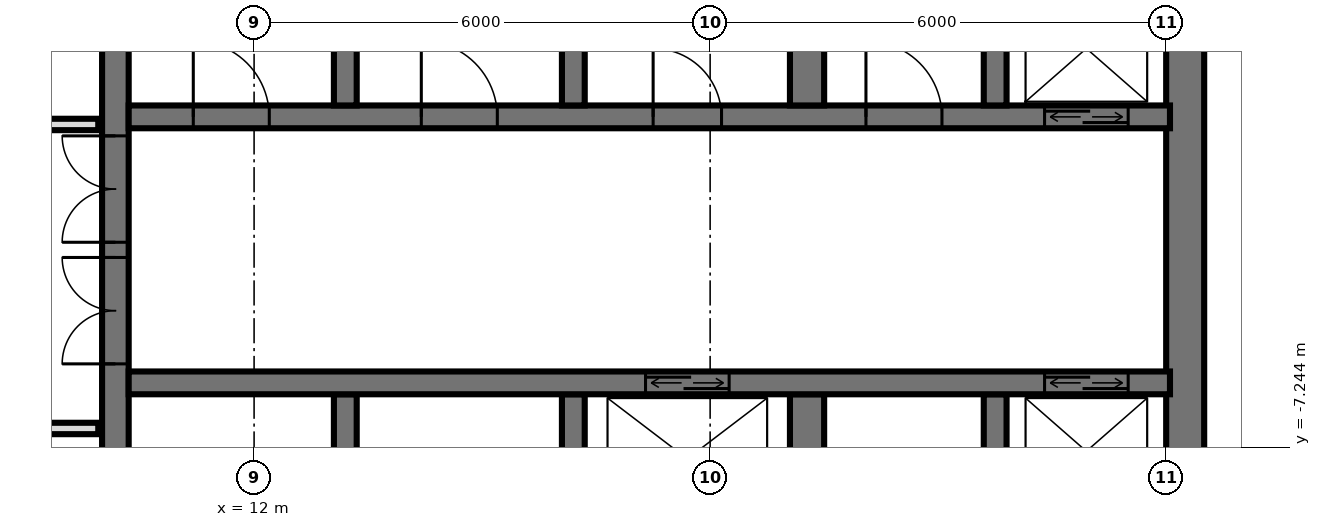
"""IFC4 building model, lengths in metres.
Left out: names, types, materials, properties, quantities, classifications, styles, units other than length and angle.
Written with IfcOpenShell. Run it as: python <this file> out.ifc"""

import sys

from ifc_helpers import new_model, si_unit, direction, frame, frame_2d, origin, place, context, subcontext, project, spatial, rectangle, extrude, element, fill, save


model = new_model("IFC4")
c1 = context("Model", 3, precision=1e-05, world=origin(), true_north=direction((0.0, 1.0)))
c2 = subcontext(c1, "Body", "Model", "MODEL_VIEW")
j1 = project(units=[si_unit("LENGTHUNIT", "METRE"), si_unit("PLANEANGLEUNIT", "RADIAN")], contexts=[c1])
p1 = place(None, origin())
s1 = spatial("IfcSite", under=j1, at=p1, CompositionType="ELEMENT")
p2 = place(p1, origin())
s2 = spatial("IfcBuilding", under=s1, at=p2, CompositionType="ELEMENT")
p3 = place(p2, frame((0.0, 0.0, 236.1)))
s3 = spatial("IfcBuildingStorey", under=s2, at=p3, CompositionType="ELEMENT", Elevation=236.1)
p4 = place(p3, frame((10.175, -14.55, 0.0), z_axis=(0.0, 0.0, 1.0), x_axis=(0.0, 1.0, 0.0)))
e1 = element("IfcWall", 1, at=p4, inside=s3, PredefinedType="SHEAR", context=c2, shape_type="SweptSolid", body=[
    extrude(rectangle(XDim=14.1, YDim=0.35, at=frame_2d((7.05, 0.0))), origin(), (0.0, 0.0, 1.0), 3.5),
])
p5 = place(p4, frame((8.4, 0.0, 0.0)))
e2 = element("IfcOpeningElement", 2, at=p5, cuts=e1, PredefinedType="OPENING", context=c2, shape_type="SweptSolid", body=[
    extrude(rectangle(XDim=1.4, YDim=2.4, at=frame_2d((0.7, 1.2))), frame((0.0, 0.185, 0.0), z_axis=(0.0, -1.0, 0.0), x_axis=(1.0, 0.0, 0.0)), (0.0, 0.0, 1.0), 0.37),
])
p6 = place(p4, frame((10.0, 0.0, 0.0)))
e3 = element("IfcOpeningElement", 3, at=p6, cuts=e1, PredefinedType="OPENING", context=c2, shape_type="SweptSolid", body=[
    extrude(rectangle(XDim=1.4, YDim=2.4, at=frame_2d((0.7, 1.2))), frame((0.0, 0.185, 0.0), z_axis=(0.0, -1.0, 0.0), x_axis=(1.0, 0.0, 0.0)), (0.0, 0.0, 1.0), 0.37),
])
p7 = place(p4, frame((4.0, 0.0, 0.0)))
e4 = element("IfcOpeningElement", 4, at=p7, cuts=e1, PredefinedType="OPENING", context=c2, shape_type="SweptSolid", body=[
    extrude(rectangle(XDim=1.2, YDim=2.1, at=frame_2d((0.6, 1.05))), frame((0.0, 0.185, 0.0), z_axis=(0.0, -1.0, 0.0), x_axis=(1.0, 0.0, 0.0)), (0.0, 0.0, 1.0), 0.37),
])
p8 = place(p3, frame((24.25, -14.55, 0.0), z_axis=(0.0, 0.0, 1.0), x_axis=(0.0, 1.0, 0.0)))
e5 = element("IfcWall", 5, at=p8, inside=s3, PredefinedType="SHEAR", context=c2, shape_type="SweptSolid", body=[
    extrude(rectangle(XDim=14.1, YDim=0.5, at=frame_2d((7.05, 0.0))), origin(), (0.0, 0.0, 1.0), 3.5),
])
p9 = place(p3, frame((10.35, -2.9, 0.0), z_axis=(0.0, 0.0, 1.0), x_axis=(1.0, 0.0, 0.0)))
e6 = element("IfcWall", 6, at=p9, inside=s3, PredefinedType="SHEAR", context=c2, shape_type="SweptSolid", body=[
    extrude(rectangle(XDim=13.7, YDim=0.3, at=frame_2d((6.85, 0.0))), origin(), (0.0, 0.0, 1.0), 3.5),
])
p10 = place(p9, frame((12.05, 0.0, 0.0)))
e7 = element("IfcOpeningElement", 7, at=p10, cuts=e6, PredefinedType="OPENING", context=c2, shape_type="SweptSolid", body=[
    extrude(rectangle(XDim=1.1, YDim=2.1, at=frame_2d((0.55, 1.05))), frame((0.0, 0.16, 0.0), z_axis=(0.0, -1.0, 0.0), x_axis=(1.0, 0.0, 0.0)), (0.0, 0.0, 1.0), 0.32),
])
p11 = place(p9, frame((6.9, 0.0, 0.0)))
e8 = element("IfcOpeningElement", 8, at=p11, cuts=e6, PredefinedType="OPENING", context=c2, shape_type="SweptSolid", body=[
    extrude(rectangle(XDim=0.9, YDim=2.1, at=frame_2d((0.45, 1.05))), frame((0.0, 0.16, 0.0), z_axis=(0.0, -1.0, 0.0), x_axis=(1.0, 0.0, 0.0)), (0.0, 0.0, 1.0), 0.32),
])
p12 = place(p9, frame((0.85, 0.0, 0.0)))
e9 = element("IfcOpeningElement", 9, at=p12, cuts=e6, PredefinedType="OPENING", context=c2, shape_type="SweptSolid", body=[
    extrude(rectangle(XDim=1.0, YDim=2.1, at=frame_2d((0.5, 1.05))), frame((0.0, 0.16, 0.0), z_axis=(0.0, -1.0, 0.0), x_axis=(1.0, 0.0, 0.0)), (0.0, 0.0, 1.0), 0.32),
])
p13 = place(p9, frame((3.85, 0.0, 0.0)))
e10 = element("IfcOpeningElement", 10, at=p13, cuts=e6, PredefinedType="OPENING", context=c2, shape_type="SweptSolid", body=[
    extrude(rectangle(XDim=1.0, YDim=2.1, at=frame_2d((0.5, 1.05))), frame((0.0, 0.16, 0.0), z_axis=(0.0, -1.0, 0.0), x_axis=(1.0, 0.0, 0.0)), (0.0, 0.0, 1.0), 0.32),
])
p14 = place(p9, frame((9.7, 0.0, 0.0)))
e11 = element("IfcOpeningElement", 11, at=p14, cuts=e6, PredefinedType="OPENING", context=c2, shape_type="SweptSolid", body=[
    extrude(rectangle(XDim=1.0, YDim=2.1, at=frame_2d((0.5, 1.05))), frame((0.0, 0.16, 0.0), z_axis=(0.0, -1.0, 0.0), x_axis=(1.0, 0.0, 0.0)), (0.0, 0.0, 1.0), 0.32),
])
p15 = place(p3, frame((10.35, -6.4, 0.0), z_axis=(0.0, 0.0, 1.0), x_axis=(1.0, 0.0, 0.0)))
e12 = element("IfcWall", 12, at=p15, inside=s3, PredefinedType="SHEAR", context=c2, shape_type="SweptSolid", body=[
    extrude(rectangle(XDim=13.7, YDim=0.3, at=frame_2d((6.85, 0.0))), origin(), (0.0, 0.0, 1.0), 3.5),
])
p16 = place(p15, frame((12.05, 0.0, 0.0)))
e13 = element("IfcOpeningElement", 13, at=p16, cuts=e12, PredefinedType="OPENING", context=c2, shape_type="SweptSolid", body=[
    extrude(rectangle(XDim=1.1, YDim=2.1, at=frame_2d((0.55, 1.05))), frame((0.0, 0.16, 0.0), z_axis=(0.0, -1.0, 0.0), x_axis=(1.0, 0.0, 0.0)), (0.0, 0.0, 1.0), 0.32),
])
p17 = place(p15, frame((6.8, 0.0, 0.0)))
e14 = element("IfcOpeningElement", 14, at=p17, cuts=e12, PredefinedType="OPENING", context=c2, shape_type="SweptSolid", body=[
    extrude(rectangle(XDim=1.1, YDim=2.1, at=frame_2d((0.55, 1.05))), frame((0.0, 0.16, 0.0), z_axis=(0.0, -1.0, 0.0), x_axis=(1.0, 0.0, 0.0)), (0.0, 0.0, 1.0), 0.32),
])
for number, where, z_axis, x_axis in (
    (15, (13.2, -2.75, 0.0), (0.0, 0.0, 1.0), (0.0, 1.0, 0.0)),
    (16, (13.2, -8.85, 0.0), (0.0, 0.0, 1.0), (0.0, 1.0, 0.0)),
    (17, (16.2, -2.75, 0.0), (0.0, 0.0, 1.0), (0.0, 1.0, 0.0)),
    (18, (16.2, -8.85, 0.0), (0.0, 0.0, 1.0), (0.0, 1.0, 0.0)),
):
    element("IfcWall", number, at=place(p3, frame(where, z_axis=z_axis, x_axis=x_axis)), inside=s3, PredefinedType="SHEAR", context=c2, shape_type="SweptSolid", body=[
        extrude(rectangle(XDim=2.3, YDim=0.3, at=frame_2d((1.15, 0.0))), origin(), (0.0, 0.0, 1.0), 3.5),
    ])
for number, where, z_axis, x_axis in (
    (19, (19.275, -2.75, 0.0), (0.0, 0.0, 1.0), (0.0, 1.0, 0.0)),
    (20, (19.275, -8.85, 0.0), (0.0, 0.0, 1.0), (0.0, 1.0, 0.0)),
):
    element("IfcWall", number, at=place(p3, frame(where, z_axis=z_axis, x_axis=x_axis)), inside=s3, PredefinedType="SHEAR", context=c2, shape_type="SweptSolid", body=[
        extrude(rectangle(XDim=2.3, YDim=0.45, at=frame_2d((1.15, 0.0))), origin(), (0.0, 0.0, 1.0), 3.5),
    ])
for number, where, z_axis, x_axis in (
    (21, (21.75, -2.75, 0.0), (0.0, 0.0, 1.0), (0.0, 1.0, 0.0)),
    (22, (21.75, -8.85, 0.0), (0.0, 0.0, 1.0), (0.0, 1.0, 0.0)),
):
    element("IfcWall", number, at=place(p3, frame(where, z_axis=z_axis, x_axis=x_axis)), inside=s3, PredefinedType="SHEAR", context=c2, shape_type="SweptSolid", body=[
        extrude(rectangle(XDim=2.3, YDim=0.3, at=frame_2d((1.15, 0.0))), origin(), (0.0, 0.0, 1.0), 3.5),
    ])
p18 = place(p3, frame((-9.95, -7.0, 0.0), z_axis=(0.0, 0.0, 1.0), x_axis=(1.0, 0.0, 0.0)))
e23 = element("IfcWall", 23, at=p18, inside=s3, PredefinedType="PARTITIONING", context=c2, shape_type="SweptSolid", body=[
    extrude(rectangle(XDim=19.9, YDim=0.15, at=frame_2d((9.95, 0.0))), origin(), (0.0, 0.0, 1.0), 3.22),
])
p19 = place(p18, frame((9.45, 0.0, 0.0)))
e24 = element("IfcOpeningElement", 24, at=p19, cuts=e23, PredefinedType="OPENING", context=c2, shape_type="SweptSolid", body=[
    extrude(rectangle(XDim=1.0, YDim=2.1, at=frame_2d((0.5, 1.05))), frame((0.0, 0.085, 0.0), z_axis=(0.0, -1.0, 0.0), x_axis=(1.0, 0.0, 0.0)), (0.0, 0.0, 1.0), 0.17),
])
p20 = place(p18, frame((15.45, 0.0, 0.0)))
e25 = element("IfcOpeningElement", 25, at=p20, cuts=e23, PredefinedType="OPENING", context=c2, shape_type="SweptSolid", body=[
    extrude(rectangle(XDim=1.0, YDim=2.1, at=frame_2d((0.5, 1.05))), frame((0.0, 0.085, 0.0), z_axis=(0.0, -1.0, 0.0), x_axis=(1.0, 0.0, 0.0)), (0.0, 0.0, 1.0), 0.17),
])
p21 = place(p3, frame((-9.95, -3.0, 0.0), z_axis=(0.0, 0.0, 1.0), x_axis=(1.0, 0.0, 0.0)))
e26 = element("IfcWall", 26, at=p21, inside=s3, PredefinedType="PARTITIONING", context=c2, shape_type="SweptSolid", body=[
    extrude(rectangle(XDim=19.9, YDim=0.15, at=frame_2d((9.95, 0.0))), origin(), (0.0, 0.0, 1.0), 3.22),
])
p22 = place(p21, frame((2.2, 0.0, 0.0)))
e27 = element("IfcOpeningElement", 27, at=p22, cuts=e26, PredefinedType="OPENING", context=c2, shape_type="SweptSolid", body=[
    extrude(rectangle(XDim=1.0, YDim=2.1, at=frame_2d((0.5, 1.05))), frame((0.0, 0.085, 0.0), z_axis=(0.0, -1.0, 0.0), x_axis=(1.0, 0.0, 0.0)), (0.0, 0.0, 1.0), 0.17),
])
p23 = place(p21, frame((7.2, 0.0, 0.0)))
e28 = element("IfcOpeningElement", 28, at=p23, cuts=e26, PredefinedType="OPENING", context=c2, shape_type="SweptSolid", body=[
    extrude(rectangle(XDim=1.0, YDim=2.1, at=frame_2d((0.5, 1.05))), frame((0.0, 0.085, 0.0), z_axis=(0.0, -1.0, 0.0), x_axis=(1.0, 0.0, 0.0)), (0.0, 0.0, 1.0), 0.17),
])
p24 = place(p21, frame((11.7, 0.0, 0.0)))
e29 = element("IfcOpeningElement", 29, at=p24, cuts=e26, PredefinedType="OPENING", context=c2, shape_type="SweptSolid", body=[
    extrude(rectangle(XDim=1.0, YDim=2.1, at=frame_2d((0.5, 1.05))), frame((0.0, 0.085, 0.0), z_axis=(0.0, -1.0, 0.0), x_axis=(1.0, 0.0, 0.0)), (0.0, 0.0, 1.0), 0.17),
])
p25 = place(p21, frame((15.45, 0.0, 0.0)))
e30 = element("IfcOpeningElement", 30, at=p25, cuts=e26, PredefinedType="OPENING", context=c2, shape_type="SweptSolid", body=[
    extrude(rectangle(XDim=1.0, YDim=2.1, at=frame_2d((0.5, 1.05))), frame((0.0, 0.085, 0.0), z_axis=(0.0, -1.0, 0.0), x_axis=(1.0, 0.0, 0.0)), (0.0, 0.0, 1.0), 0.17),
])
p26 = place(p21, frame((18.2, 0.0, 0.0)))
e31 = element("IfcOpeningElement", 31, at=p26, cuts=e26, PredefinedType="OPENING", context=c2, shape_type="SweptSolid", body=[
    extrude(rectangle(XDim=1.0, YDim=2.1, at=frame_2d((0.5, 1.05))), frame((0.0, 0.085, 0.0), z_axis=(0.0, -1.0, 0.0), x_axis=(1.0, 0.0, 0.0)), (0.0, 0.0, 1.0), 0.17),
])
p27 = place(p10, origin())
e32 = element("IfcDoor", 32, at=p27, inside=s3, OperationType="DOUBLE_DOOR_SLIDING", PredefinedType="USERDEFINED", context=c2, shape_type="SweptSolid", body=[
    extrude(rectangle(XDim=1.1, YDim=2.1, at=frame_2d((0.55, 1.05))), frame((0.0, 0.025, 0.0), z_axis=(0.0, -1.0, 0.0), x_axis=(1.0, 0.0, 0.0)), (0.0, 0.0, 1.0), 0.05),
])
fill(e7, e32)
p28 = place(p16, origin())
e33 = element("IfcDoor", 33, at=p28, inside=s3, OperationType="DOUBLE_DOOR_SLIDING", PredefinedType="USERDEFINED", context=c2, shape_type="SweptSolid", body=[
    extrude(rectangle(XDim=1.1, YDim=2.1, at=frame_2d((0.55, 1.05))), frame((0.0, 0.025, 0.0), z_axis=(0.0, -1.0, 0.0), x_axis=(1.0, 0.0, 0.0)), (0.0, 0.0, 1.0), 0.05),
])
fill(e13, e33)
p29 = place(p17, origin())
e34 = element("IfcDoor", 34, at=p29, inside=s3, OperationType="DOUBLE_DOOR_SLIDING", PredefinedType="USERDEFINED", context=c2, shape_type="SweptSolid", body=[
    extrude(rectangle(XDim=1.1, YDim=2.1, at=frame_2d((0.55, 1.05))), frame((0.0, 0.025, 0.0), z_axis=(0.0, -1.0, 0.0), x_axis=(1.0, 0.0, 0.0)), (0.0, 0.0, 1.0), 0.05),
])
fill(e14, e34)
p30 = place(p5, origin())
e35 = element("IfcDoor", 35, at=p30, inside=s3, OperationType="DOUBLE_DOOR_SINGLE_SWING", PredefinedType="DOOR", context=c2, shape_type="SweptSolid", body=[
    extrude(rectangle(XDim=1.4, YDim=2.4, at=frame_2d((0.7, 1.2))), frame((0.0, 0.025, 0.0), z_axis=(0.0, -1.0, 0.0), x_axis=(1.0, 0.0, 0.0)), (0.0, 0.0, 1.0), 0.05),
])
fill(e2, e35)
p31 = place(p6, origin())
e36 = element("IfcDoor", 36, at=p31, inside=s3, OperationType="DOUBLE_DOOR_SINGLE_SWING", PredefinedType="DOOR", context=c2, shape_type="SweptSolid", body=[
    extrude(rectangle(XDim=1.4, YDim=2.4, at=frame_2d((0.7, 1.2))), frame((0.0, 0.025, 0.0), z_axis=(0.0, -1.0, 0.0), x_axis=(1.0, 0.0, 0.0)), (0.0, 0.0, 1.0), 0.05),
])
fill(e3, e36)
p32 = place(p11, origin())
e37 = element("IfcDoor", 37, at=p32, inside=s3, OperationType="SINGLE_SWING_RIGHT", PredefinedType="DOOR", context=c2, shape_type="SweptSolid", body=[
    extrude(rectangle(XDim=0.9, YDim=2.1, at=frame_2d((0.45, 1.05))), frame((0.0, 0.025, 0.0), z_axis=(0.0, -1.0, 0.0), x_axis=(1.0, 0.0, 0.0)), (0.0, 0.0, 1.0), 0.05),
])
fill(e8, e37)
p33 = place(p12, origin())
e38 = element("IfcDoor", 38, at=p33, inside=s3, OperationType="SINGLE_SWING_RIGHT", PredefinedType="DOOR", context=c2, shape_type="SweptSolid", body=[
    extrude(rectangle(XDim=1.0, YDim=2.1, at=frame_2d((0.5, 1.05))), frame((0.0, 0.025, 0.0), z_axis=(0.0, -1.0, 0.0), x_axis=(1.0, 0.0, 0.0)), (0.0, 0.0, 1.0), 0.05),
])
fill(e9, e38)
p34 = place(p13, origin())
e39 = element("IfcDoor", 39, at=p34, inside=s3, OperationType="SINGLE_SWING_RIGHT", PredefinedType="DOOR", context=c2, shape_type="SweptSolid", body=[
    extrude(rectangle(XDim=1.0, YDim=2.1, at=frame_2d((0.5, 1.05))), frame((0.0, 0.025, 0.0), z_axis=(0.0, -1.0, 0.0), x_axis=(1.0, 0.0, 0.0)), (0.0, 0.0, 1.0), 0.05),
])
fill(e10, e39)
p35 = place(p14, origin())
e40 = element("IfcDoor", 40, at=p35, inside=s3, OperationType="SINGLE_SWING_RIGHT", PredefinedType="DOOR", context=c2, shape_type="SweptSolid", body=[
    extrude(rectangle(XDim=1.0, YDim=2.1, at=frame_2d((0.5, 1.05))), frame((0.0, 0.025, 0.0), z_axis=(0.0, -1.0, 0.0), x_axis=(1.0, 0.0, 0.0)), (0.0, 0.0, 1.0), 0.05),
])
fill(e11, e40)
save(model, sys.argv[1])
